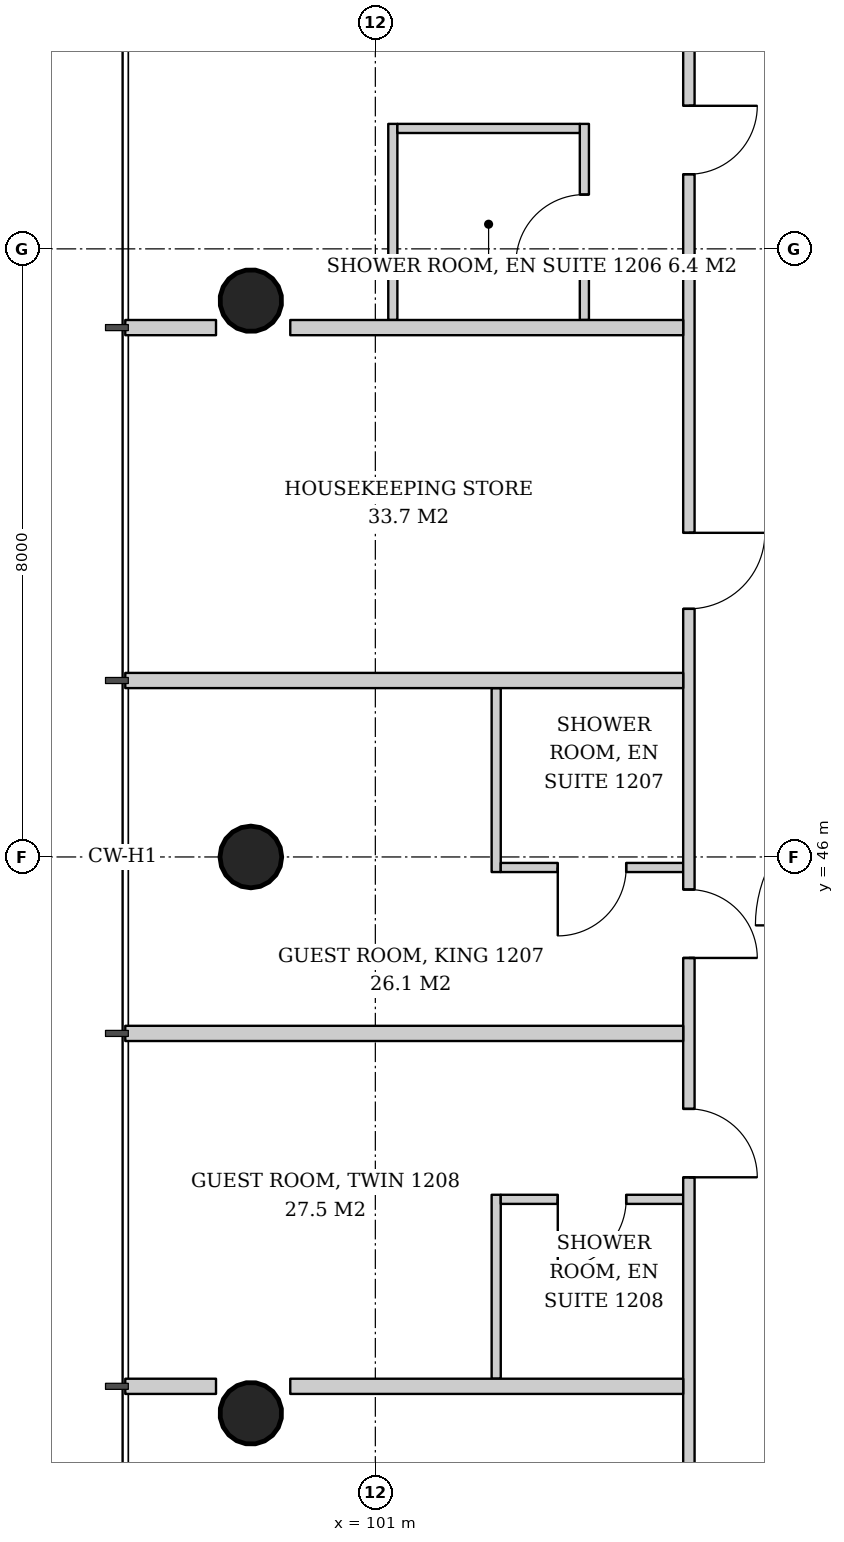
"""IFC4 building model, lengths in metres.
Left out: names, types, materials, properties, quantities, classifications, styles, units other than length and angle.
Written with IfcOpenShell. Run it as: python <this file> out.ifc"""

import sys

from ifc_helpers import new_model, si_unit, direction, frame, frame_2d, origin, origin_2d, place, context, subcontext, project, spatial, rectangle, hollow_circle, extrude, element, fill, save


model = new_model("IFC4")
c1 = context("Model", 3, precision=1e-05, world=origin(), true_north=direction((0.0, 1.0)))
c2 = subcontext(c1, "Body", "Model", "MODEL_VIEW")
j1 = project(units=[si_unit("LENGTHUNIT", "METRE"), si_unit("PLANEANGLEUNIT", "RADIAN")], contexts=[c1])
p1 = place(None, origin())
s1 = spatial("IfcSite", under=j1, at=p1, CompositionType="ELEMENT")
p2 = place(p1, origin())
s2 = spatial("IfcBuilding", under=s1, at=p2, CompositionType="ELEMENT")
p3 = place(p2, frame((0.0, 0.0, 51.4)))
s3 = spatial("IfcBuildingStorey", under=s2, at=p3, CompositionType="ELEMENT", Elevation=51.4)
p4 = place(p3, frame((99.31, 53.345, 0.0), z_axis=(0.043059584825, -0.021497706284, 0.998841188968), x_axis=(0.446680166538, 0.894693706707, 0.0)))
e1 = element("IfcColumn", 1, at=p4, inside=s3, PredefinedType="COLUMN", context=c2, shape_type="SweptSolid", body=[
    extrude(hollow_circle(Radius=0.406, WallThickness=0.03, at=origin_2d()), origin(), (0.0, 0.0, 1.0), 3.804),
])
p5 = place(p3, frame((99.31, 46.0, 0.0), z_axis=(0.043069538298, 0.0, 0.999072076915), x_axis=(0.0, 1.0, 0.0)))
e2 = element("IfcColumn", 2, at=p5, inside=s3, PredefinedType="COLUMN", context=c2, shape_type="SweptSolid", body=[
    extrude(hollow_circle(Radius=0.406, WallThickness=0.03, at=origin_2d()), origin(), (0.0, 0.0, 1.0), 3.803),
])
p6 = place(p3, frame((99.31, 38.655, 0.0), z_axis=(0.043059584825, 0.021497706284, 0.998841188968), x_axis=(-0.446680166538, 0.894693706707, 0.0)))
e3 = element("IfcColumn", 3, at=p6, inside=s3, PredefinedType="COLUMN", context=c2, shape_type="SweptSolid", body=[
    extrude(hollow_circle(Radius=0.406, WallThickness=0.03, at=origin_2d()), origin(), (0.0, 0.0, 1.0), 3.804),
])
p7 = place(p3, frame((103.75, 53.064, 0.0), z_axis=(0.0, 0.0, 1.0), x_axis=(0.0, 1.0, 0.0)))
e4 = element("IfcWall", 4, at=p7, inside=s3, PredefinedType="PARTITIONING", context=c2, shape_type="SweptSolid", body=[
    extrude(rectangle(XDim=2.58, YDim=0.12, at=frame_2d((1.29, 0.0))), origin(), (0.0, 0.0, 1.0), 2.8),
])
p8 = place(p7, frame((0.75, 0.0, 0.0)))
e5 = element("IfcOpeningElement", 5, at=p8, cuts=e4, PredefinedType="OPENING", context=c2, shape_type="SweptSolid", body=[
    extrude(rectangle(XDim=0.9, YDim=2.1, at=frame_2d((0.45, 1.05))), frame((0.0, 0.07, 0.0), z_axis=(0.0, -1.0, 0.0), x_axis=(1.0, 0.0, 0.0)), (0.0, 0.0, 1.0), 0.14),
])
p9 = place(p3, frame((101.23, 53.064, 0.0), z_axis=(0.0, 0.0, 1.0), x_axis=(0.0, 1.0, 0.0)))
e6 = element("IfcWall", 6, at=p9, inside=s3, PredefinedType="PARTITIONING", context=c2, shape_type="SweptSolid", body=[
    extrude(rectangle(XDim=2.58, YDim=0.12, at=frame_2d((1.29, 0.0))), origin(), (0.0, 0.0, 1.0), 2.8),
])
p10 = place(p3, frame((103.69, 55.584, 0.0), z_axis=(0.0, 0.0, 1.0), x_axis=(-1.0, 0.0, 0.0)))
e7 = element("IfcWall", 7, at=p10, inside=s3, PredefinedType="PARTITIONING", context=c2, shape_type="SweptSolid", body=[
    extrude(rectangle(XDim=2.4, YDim=0.12, at=frame_2d((1.2, 0.0))), origin(), (0.0, 0.0, 1.0), 3.6),
])
p11 = place(p3, frame((102.59, 48.221, 0.0), z_axis=(0.0, 0.0, 1.0), x_axis=(0.0, -1.0, 0.0)))
e8 = element("IfcWall", 8, at=p11, inside=s3, PredefinedType="PARTITIONING", context=c2, shape_type="SweptSolid", body=[
    extrude(rectangle(XDim=2.42, YDim=0.12, at=frame_2d((1.21, 0.0))), origin(), (0.0, 0.0, 1.0), 2.847),
])
p12 = place(p3, frame((105.05, 45.861, 0.0), z_axis=(0.0, 0.0, 1.0), x_axis=(-1.0, 0.0, 0.0)))
e9 = element("IfcWall", 9, at=p12, inside=s3, PredefinedType="PARTITIONING", context=c2, shape_type="SweptSolid", body=[
    extrude(rectangle(XDim=2.4, YDim=0.12, at=frame_2d((1.2, 0.0))), origin(), (0.0, 0.0, 1.0), 3.6),
])
p13 = place(p12, frame((0.75, 0.0, 0.0)))
e10 = element("IfcOpeningElement", 10, at=p13, cuts=e9, PredefinedType="OPENING", context=c2, shape_type="SweptSolid", body=[
    extrude(rectangle(XDim=0.9, YDim=2.1, at=frame_2d((0.45, 1.05))), frame((0.0, 0.07, 0.0), z_axis=(0.0, -1.0, 0.0), x_axis=(1.0, 0.0, 0.0)), (0.0, 0.0, 1.0), 0.14),
])
p14 = place(p3, frame((102.59, 41.556, 0.0), z_axis=(0.0, 0.0, 1.0), x_axis=(0.0, -1.0, 0.0)))
e11 = element("IfcWall", 11, at=p14, inside=s3, PredefinedType="PARTITIONING", context=c2, shape_type="SweptSolid", body=[
    extrude(rectangle(XDim=2.42, YDim=0.12, at=frame_2d((1.21, 0.0))), origin(), (0.0, 0.0, 1.0), 3.6),
])
p15 = place(p3, frame((105.05, 41.496, 0.0), z_axis=(0.0, 0.0, 1.0), x_axis=(-1.0, 0.0, 0.0)))
e12 = element("IfcWall", 12, at=p15, inside=s3, PredefinedType="PARTITIONING", context=c2, shape_type="SweptSolid", body=[
    extrude(rectangle(XDim=2.4, YDim=0.12, at=frame_2d((1.2, 0.0))), origin(), (0.0, 0.0, 1.0), 3.6),
])
p16 = place(p15, frame((0.75, 0.0, 0.0)))
e13 = element("IfcOpeningElement", 13, at=p16, cuts=e12, PredefinedType="OPENING", context=c2, shape_type="SweptSolid", body=[
    extrude(rectangle(XDim=0.9, YDim=2.1, at=frame_2d((0.45, 1.05))), frame((0.0, 0.07, 0.0), z_axis=(0.0, -1.0, 0.0), x_axis=(1.0, 0.0, 0.0)), (0.0, 0.0, 1.0), 0.14),
])
p17 = place(p3, frame((105.125, 57.95, 0.0), z_axis=(0.0, 0.0, 1.0), x_axis=(0.0, -1.0, 0.0)))
e14 = element("IfcWall", 14, at=p17, inside=s3, PredefinedType="PARTITIONING", context=c2, shape_type="SweptSolid", body=[
    extrude(rectangle(XDim=23.75, YDim=0.15, at=frame_2d((11.875, 0.0))), origin(), (0.0, 0.0, 1.0), 2.8),
])
p18 = place(p17, frame((2.068, 0.0, 0.0)))
e15 = element("IfcOpeningElement", 15, at=p18, cuts=e14, PredefinedType="OPENING", context=c2, shape_type="SweptSolid", body=[
    extrude(rectangle(XDim=0.9, YDim=2.1, at=frame_2d((0.45, 1.05))), frame((0.0, 0.085, 0.0), z_axis=(0.0, -1.0, 0.0), x_axis=(1.0, 0.0, 0.0)), (0.0, 0.0, 1.0), 0.17),
])
p19 = place(p17, frame((7.686, 0.0, 0.0)))
e16 = element("IfcOpeningElement", 16, at=p19, cuts=e14, PredefinedType="OPENING", context=c2, shape_type="SweptSolid", body=[
    extrude(rectangle(XDim=1.0, YDim=2.1, at=frame_2d((0.5, 1.05))), frame((0.0, 0.085, 0.0), z_axis=(0.0, -1.0, 0.0), x_axis=(1.0, 0.0, 0.0)), (0.0, 0.0, 1.0), 0.17),
])
p20 = place(p17, frame((12.379, 0.0, 0.0)))
e17 = element("IfcOpeningElement", 17, at=p20, cuts=e14, PredefinedType="OPENING", context=c2, shape_type="SweptSolid", body=[
    extrude(rectangle(XDim=0.9, YDim=2.1, at=frame_2d((0.45, 1.05))), frame((0.0, 0.085, 0.0), z_axis=(0.0, -1.0, 0.0), x_axis=(1.0, 0.0, 0.0)), (0.0, 0.0, 1.0), 0.17),
])
p21 = place(p17, frame((15.264, 0.0, 0.0)))
e18 = element("IfcOpeningElement", 18, at=p21, cuts=e14, PredefinedType="OPENING", context=c2, shape_type="SweptSolid", body=[
    extrude(rectangle(XDim=0.9, YDim=2.1, at=frame_2d((0.45, 1.05))), frame((0.0, 0.085, 0.0), z_axis=(0.0, -1.0, 0.0), x_axis=(1.0, 0.0, 0.0)), (0.0, 0.0, 1.0), 0.17),
])
p22 = place(p3, frame((105.05, 52.964, 0.0), z_axis=(0.0, 0.0, 1.0), x_axis=(-1.0, 0.0, 0.0)))
e19 = element("IfcWall", 19, at=p22, inside=s3, PredefinedType="PARTITIONING", context=c2, shape_type="SweptSolid", body=[
    extrude(rectangle(XDim=5.169, YDim=0.2, at=frame_2d((2.585, 0.0))), origin(), (0.0, 0.0, 1.0), 3.6),
])
p23 = place(p3, frame((98.904, 52.964, 0.0), z_axis=(0.0, 0.0, 1.0), x_axis=(-1.0, 0.0, 0.0)))
e20 = element("IfcWall", 20, at=p23, inside=s3, PredefinedType="PARTITIONING", context=c2, shape_type="SweptSolid", body=[
    extrude(rectangle(XDim=1.194, YDim=0.2, at=frame_2d((0.597, 0.0))), origin(), (0.0, 0.0, 1.0), 3.6),
])
for number, where, z_axis, x_axis in (
    (21, (105.05, 48.322, 0.0), (0.0, 0.0, 1.0), (-1.0, 0.0, 0.0)),
    (22, (105.05, 43.678, 0.0), (0.0, 0.0, 1.0), (-1.0, 0.0, 0.0)),
):
    element("IfcWall", number, at=place(p3, frame(where, z_axis=z_axis, x_axis=x_axis)), inside=s3, PredefinedType="PARTITIONING", context=c2, shape_type="SweptSolid", body=[
        extrude(rectangle(XDim=7.34, YDim=0.2, at=frame_2d((3.67, 0.0))), origin(), (0.0, 0.0, 1.0), 3.05),
    ])
p24 = place(p3, frame((105.05, 39.036, 0.0), z_axis=(0.0, 0.0, 1.0), x_axis=(-1.0, 0.0, 0.0)))
e23 = element("IfcWall", 23, at=p24, inside=s3, PredefinedType="PARTITIONING", context=c2, shape_type="SweptSolid", body=[
    extrude(rectangle(XDim=5.169, YDim=0.2, at=frame_2d((2.585, 0.0))), origin(), (0.0, 0.0, 1.0), 3.6),
])
p25 = place(p3, frame((98.904, 39.036, 0.0), z_axis=(0.0, 0.0, 1.0), x_axis=(-1.0, 0.0, 0.0)))
e24 = element("IfcWall", 24, at=p25, inside=s3, PredefinedType="PARTITIONING", context=c2, shape_type="SweptSolid", body=[
    extrude(rectangle(XDim=1.194, YDim=0.2, at=frame_2d((0.597, 0.0))), origin(), (0.0, 0.0, 1.0), 3.6),
])
p26 = place(p8, origin())
e25 = element("IfcDoor", 25, at=p26, inside=s3, OperationType="SINGLE_SWING_LEFT", PredefinedType="DOOR", context=c2, shape_type="SweptSolid", body=[
    extrude(rectangle(XDim=0.9, YDim=2.1, at=frame_2d((0.45, 1.05))), frame((0.0, 0.025, 0.0), z_axis=(0.0, -1.0, 0.0), x_axis=(1.0, 0.0, 0.0)), (0.0, 0.0, 1.0), 0.05),
])
fill(e5, e25)
p27 = place(p13, origin())
e26 = element("IfcDoor", 26, at=p27, inside=s3, OperationType="SINGLE_SWING_RIGHT", PredefinedType="DOOR", context=c2, shape_type="SweptSolid", body=[
    extrude(rectangle(XDim=0.9, YDim=2.1, at=frame_2d((0.45, 1.05))), frame((0.0, 0.025, 0.0), z_axis=(0.0, -1.0, 0.0), x_axis=(1.0, 0.0, 0.0)), (0.0, 0.0, 1.0), 0.05),
])
fill(e10, e26)
p28 = place(p16, origin())
e27 = element("IfcDoor", 27, at=p28, inside=s3, OperationType="SINGLE_SWING_RIGHT", PredefinedType="DOOR", context=c2, shape_type="SweptSolid", body=[
    extrude(rectangle(XDim=0.9, YDim=2.1, at=frame_2d((0.45, 1.05))), frame((0.0, 0.025, 0.0), z_axis=(0.0, -1.0, 0.0), x_axis=(1.0, 0.0, 0.0)), (0.0, 0.0, 1.0), 0.05),
])
fill(e13, e27)
p29 = place(p18, origin())
e28 = element("IfcDoor", 28, at=p29, inside=s3, OperationType="SINGLE_SWING_LEFT", PredefinedType="DOOR", context=c2, shape_type="SweptSolid", body=[
    extrude(rectangle(XDim=0.9, YDim=2.1, at=frame_2d((0.45, 1.05))), frame((0.0, 0.025, 0.0), z_axis=(0.0, -1.0, 0.0), x_axis=(1.0, 0.0, 0.0)), (0.0, 0.0, 1.0), 0.05),
])
fill(e15, e28)
p30 = place(p19, origin())
e29 = element("IfcDoor", 29, at=p30, inside=s3, OperationType="SINGLE_SWING_LEFT", PredefinedType="DOOR", context=c2, shape_type="SweptSolid", body=[
    extrude(rectangle(XDim=1.0, YDim=2.1, at=frame_2d((0.5, 1.05))), frame((0.0, 0.025, 0.0), z_axis=(0.0, -1.0, 0.0), x_axis=(1.0, 0.0, 0.0)), (0.0, 0.0, 1.0), 0.05),
])
fill(e16, e29)
p31 = place(p20, origin())
e30 = element("IfcDoor", 30, at=p31, inside=s3, OperationType="SINGLE_SWING_RIGHT", PredefinedType="DOOR", context=c2, shape_type="SweptSolid", body=[
    extrude(rectangle(XDim=0.9, YDim=2.1, at=frame_2d((0.45, 1.05))), frame((0.0, 0.025, 0.0), z_axis=(0.0, -1.0, 0.0), x_axis=(1.0, 0.0, 0.0)), (0.0, 0.0, 1.0), 0.05),
])
fill(e17, e30)
p32 = place(p21, origin())
e31 = element("IfcDoor", 31, at=p32, inside=s3, OperationType="SINGLE_SWING_RIGHT", PredefinedType="DOOR", context=c2, shape_type="SweptSolid", body=[
    extrude(rectangle(XDim=0.9, YDim=2.1, at=frame_2d((0.45, 1.05))), frame((0.0, 0.025, 0.0), z_axis=(0.0, -1.0, 0.0), x_axis=(1.0, 0.0, 0.0)), (0.0, 0.0, 1.0), 0.05),
])
fill(e18, e31)
save(model, sys.argv[1])
